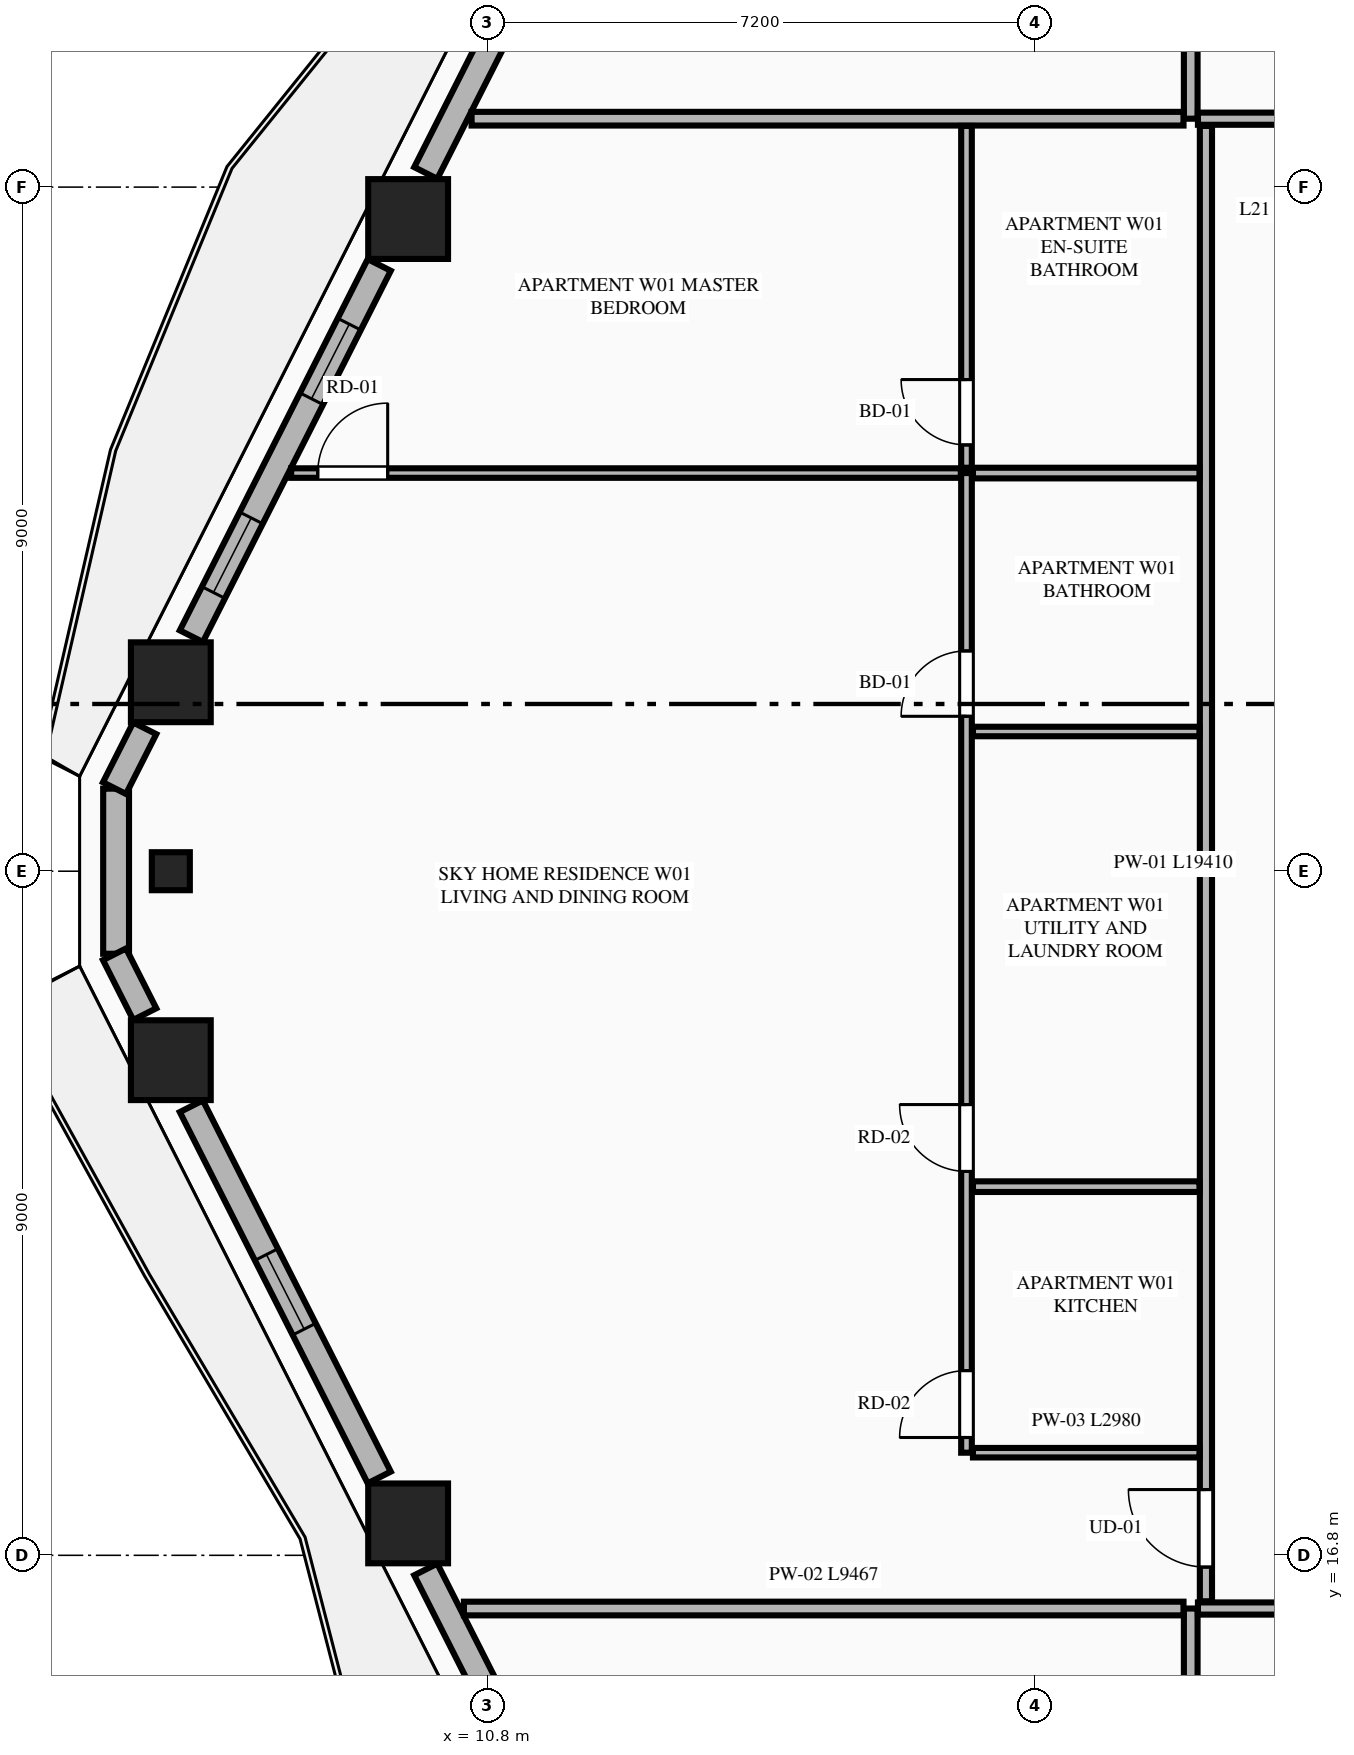
"""IFC4 building model, lengths in metres.
Left out: names, types, materials, properties, quantities, classifications, styles, units other than length and angle.
Written with IfcOpenShell. Run it as: python <this file> out.ifc"""

import sys

from ifc_helpers import new_model, si_unit, direction, frame, frame_2d, origin, origin_2d, place, context, subcontext, project, spatial, rectangle, extrude, element, fill, save


model = new_model("IFC4")
c1 = context("Model", 3, precision=1e-05, world=origin(), true_north=direction((0.0, 1.0)))
c2 = subcontext(c1, "Body", "Model", "MODEL_VIEW")
j1 = project(units=[si_unit("LENGTHUNIT", "METRE"), si_unit("PLANEANGLEUNIT", "RADIAN")], contexts=[c1])
p1 = place(None, origin())
s1 = spatial("IfcSite", under=j1, at=p1, CompositionType="ELEMENT")
p2 = place(p1, origin())
s2 = spatial("IfcBuilding", under=s1, at=p2, CompositionType="ELEMENT")
p3 = place(p2, frame((0.0, 0.0, 83.55)))
s3 = spatial("IfcBuildingStorey", under=s2, at=p3, CompositionType="ELEMENT", Elevation=83.55)
for number, where, z_axis, x_axis in (
    (1, (9.754, 34.38, 0.0), (0.0, 0.0, 1.0), (1.0, 0.0, 0.0)),
    (2, (6.632, 28.286, 0.0), (0.0, 0.0, 1.0), (1.0, 0.0, 0.0)),
    (3, (6.632, 23.314, 0.0), (0.0, 0.0, 1.0), (1.0, 0.0, 0.0)),
    (4, (9.754, 17.22, 0.0), (0.0, 0.0, 1.0), (1.0, 0.0, 0.0)),
):
    element("IfcColumn", number, at=place(p3, frame(where, z_axis=z_axis, x_axis=x_axis)), inside=s3, PredefinedType="COLUMN", context=c2, shape_type="SweptSolid", body=[
        extrude(rectangle(XDim=1.05, YDim=1.05, at=origin_2d()), origin(), (0.0, 0.0, 1.0), 3.55),
    ])
p4 = place(p3, frame((6.632, 25.8, 0.0), z_axis=(0.0, 0.0, 1.0), x_axis=(0.0, -1.0, 0.0)))
e5 = element("IfcColumn", 5, at=p4, inside=s3, PredefinedType="PILASTER", context=c2, shape_type="SweptSolid", body=[
    extrude(rectangle(XDim=0.5, YDim=0.35, at=origin_2d()), origin(), (0.0, 0.0, 1.0), 3.55),
])
p5 = place(p3, frame((5.912, 26.886, 0.0), z_axis=(0.0, 0.0, 1.0), x_axis=(0.0, -1.0, 0.0)))
e6 = element("IfcWall", 6, at=p5, inside=s3, PredefinedType="STANDARD", context=c2, shape_type="SweptSolid", body=[
    extrude(rectangle(XDim=2.172, YDim=0.34, at=frame_2d((1.086, 0.0))), origin(), (0.0, 0.0, 1.0), 3.33),
])
p6 = place(p3, frame((12.567, 40.085, 0.0), z_axis=(0.0, 0.0, 1.0), x_axis=(-0.451599886425, -0.892220568347, 0.0)))
e7 = element("IfcWall", 7, at=p6, inside=s3, PredefinedType="STANDARD", context=c2, shape_type="SweptSolid", body=[
    extrude(rectangle(XDim=5.715, YDim=0.34, at=frame_2d((2.857, 0.0))), origin(), (0.0, 0.0, 1.0), 2.787),
])
p7 = place(p6, frame((1.782, 0.0, 0.0)))
e8 = element("IfcOpeningElement", 8, at=p7, cuts=e7, PredefinedType="OPENING", context=c2, shape_type="SweptSolid", body=[
    extrude(rectangle(XDim=1.1, YDim=2.25, at=frame_2d((0.55, 1.125))), frame((0.0, 0.18, 0.0), z_axis=(0.0, -1.0, 0.0), x_axis=(1.0, 0.0, 0.0)), (0.0, 0.0, 1.0), 0.36),
])
p8 = place(p3, frame((9.374, 33.776, 0.0), z_axis=(0.0, 0.0, 1.0), x_axis=(-0.451597066012, -0.892221995901, 0.0)))
e9 = element("IfcWall", 9, at=p8, inside=s3, PredefinedType="STANDARD", context=c2, shape_type="SweptSolid", body=[
    extrude(rectangle(XDim=5.474, YDim=0.34, at=frame_2d((2.737, 0.0))), origin(), (0.0, 0.0, 1.0), 2.787),
])
p9 = place(p8, frame((0.873, 0.0, 0.75)))
e10 = element("IfcOpeningElement", 10, at=p9, cuts=e9, PredefinedType="OPENING", context=c2, shape_type="SweptSolid", body=[
    extrude(rectangle(XDim=1.1, YDim=1.887, at=frame_2d((0.55, 0.943))), frame((0.0, 0.18, 0.0), z_axis=(0.0, -1.0, 0.0), x_axis=(1.0, 0.0, 0.0)), (0.0, 0.0, 1.0), 0.36),
])
p10 = place(p8, frame((3.73, 0.0, 0.75)))
e11 = element("IfcOpeningElement", 11, at=p10, cuts=e9, PredefinedType="OPENING", context=c2, shape_type="SweptSolid", body=[
    extrude(rectangle(XDim=1.1, YDim=1.887, at=frame_2d((0.55, 0.943))), frame((0.0, 0.18, 0.0), z_axis=(0.0, -1.0, 0.0), x_axis=(1.0, 0.0, 0.0)), (0.0, 0.0, 1.0), 0.36),
])
p11 = place(p3, frame((6.289, 27.68, 0.0), z_axis=(0.0, 0.0, 1.0), x_axis=(-0.451306655769, -0.892368927327, 0.0)))
e12 = element("IfcWall", 12, at=p11, inside=s3, PredefinedType="STANDARD", context=c2, shape_type="SweptSolid", body=[
    extrude(rectangle(XDim=0.882, YDim=0.34, at=frame_2d((0.441, 0.0))), origin(), (0.0, 0.0, 1.0), 3.33),
])
p12 = place(p3, frame((5.891, 24.707, 0.0), z_axis=(0.0, 0.0, 1.0), x_axis=(0.451195173259, -0.892425299747, 0.0)))
e13 = element("IfcWall", 13, at=p12, inside=s3, PredefinedType="STANDARD", context=c2, shape_type="SweptSolid", body=[
    extrude(rectangle(XDim=0.882, YDim=0.34, at=frame_2d((0.441, 0.0))), origin(), (0.0, 0.0, 1.0), 3.33),
])
p13 = place(p3, frame((6.902, 22.708, 0.0), z_axis=(0.0, 0.0, 1.0), x_axis=(0.451579095309, -0.892231091523, 0.0)))
e14 = element("IfcWall", 14, at=p13, inside=s3, PredefinedType="STANDARD", context=c2, shape_type="SweptSolid", body=[
    extrude(rectangle(XDim=5.474, YDim=0.34, at=frame_2d((2.737, 0.0))), origin(), (0.0, 0.0, 1.0), 2.787),
])
p14 = place(p13, frame((2.187, 0.0, 0.75)))
e15 = element("IfcOpeningElement", 15, at=p14, cuts=e14, PredefinedType="OPENING", context=c2, shape_type="SweptSolid", body=[
    extrude(rectangle(XDim=1.1, YDim=1.887, at=frame_2d((0.55, 0.943))), frame((0.0, 0.18, 0.0), z_axis=(0.0, -1.0, 0.0), x_axis=(1.0, 0.0, 0.0)), (0.0, 0.0, 1.0), 0.36),
])
p15 = place(p3, frame((9.986, 16.614, 0.0), z_axis=(0.0, 0.0, 1.0), x_axis=(0.45158267371, -0.892229280401, 0.0)))
e16 = element("IfcWall", 16, at=p15, inside=s3, PredefinedType="STANDARD", context=c2, shape_type="SweptSolid", body=[
    extrude(rectangle(XDim=5.715, YDim=0.34, at=frame_2d((2.857, 0.0))), origin(), (0.0, 0.0, 1.0), 2.787),
])
p16 = place(p15, frame((2.721, 0.0, 0.0)))
e17 = element("IfcOpeningElement", 17, at=p16, cuts=e16, PredefinedType="OPENING", context=c2, shape_type="SweptSolid", body=[
    extrude(rectangle(XDim=1.1, YDim=2.25, at=frame_2d((0.55, 1.125))), frame((0.0, 0.18, 0.0), z_axis=(0.0, -1.0, 0.0), x_axis=(1.0, 0.0, 0.0)), (0.0, 0.0, 1.0), 0.36),
])
p17 = place(p3, frame((20.05, 2.455, 0.0), z_axis=(0.0, 0.0, 1.0), x_axis=(0.0, 1.0, 0.0)))
e18 = element("IfcWall", 18, at=p17, inside=s3, PredefinedType="PARTITIONING", context=c2, shape_type="SweptSolid", body=[
    extrude(rectangle(XDim=13.645, YDim=0.18, at=frame_2d((6.823, 0.0))), origin(), (0.0, 0.0, 1.0), 3.33),
])
p18 = place(p3, frame((20.145, 16.1, 0.0), z_axis=(0.0, 0.0, 1.0), x_axis=(1.0, 0.0, 0.0)))
e19 = element("IfcWall", 19, at=p18, inside=s3, PredefinedType="PARTITIONING", context=c2, shape_type="SweptSolid", body=[
    extrude(rectangle(XDim=24.51, YDim=0.16, at=frame_2d((12.255, 0.0))), origin(), (0.0, 0.0, 1.0), 3.33),
])
p19 = place(p18, frame((22.305, 0.0, 0.0)))
e20 = element("IfcOpeningElement", 20, at=p19, cuts=e19, PredefinedType="OPENING", context=c2, shape_type="SweptSolid", body=[
    extrude(rectangle(XDim=1.02, YDim=2.25, at=frame_2d((0.51, 1.125))), frame((0.0, 0.09, 0.0), z_axis=(0.0, -1.0, 0.0), x_axis=(1.0, 0.0, 0.0)), (0.0, 0.0, 1.0), 0.18),
])
p20 = place(p3, frame((20.05, 35.7, 0.0), z_axis=(0.0, 0.0, 1.0), x_axis=(0.0, 1.0, 0.0)))
e21 = element("IfcWall", 21, at=p20, inside=s3, PredefinedType="PARTITIONING", context=c2, shape_type="SweptSolid", body=[
    extrude(rectangle(XDim=13.445, YDim=0.18, at=frame_2d((6.723, 0.0))), origin(), (0.0, 0.0, 1.0), 3.33),
])
p21 = place(p3, frame((20.145, 35.7, 0.0), z_axis=(0.0, 0.0, 1.0), x_axis=(1.0, 0.0, 0.0)))
e22 = element("IfcWall", 22, at=p21, inside=s3, PredefinedType="PARTITIONING", context=c2, shape_type="SweptSolid", body=[
    extrude(rectangle(XDim=24.51, YDim=0.16, at=frame_2d((12.255, 0.0))), origin(), (0.0, 0.0, 1.0), 3.33),
])
p22 = place(p21, frame((22.305, 0.0, 0.0)))
e23 = element("IfcOpeningElement", 23, at=p22, cuts=e22, PredefinedType="OPENING", context=c2, shape_type="SweptSolid", body=[
    extrude(rectangle(XDim=1.02, YDim=2.25, at=frame_2d((0.51, 1.125))), frame((0.0, 0.09, 0.0), z_axis=(0.0, -1.0, 0.0), x_axis=(1.0, 0.0, 0.0)), (0.0, 0.0, 1.0), 0.18),
])
p23 = place(p3, frame((10.488, 16.1, 0.0), z_axis=(0.0, 0.0, 1.0), x_axis=(1.0, 0.0, 0.0)))
e24 = element("IfcWall", 24, at=p23, inside=s3, PredefinedType="PARTITIONING", context=c2, shape_type="SweptSolid", body=[
    extrude(rectangle(XDim=9.467, YDim=0.18, at=frame_2d((4.733, 0.0))), origin(), (0.0, 0.0, 1.0), 3.33),
])
p24 = place(p3, frame((10.589, 35.7, 0.0), z_axis=(0.0, 0.0, 1.0), x_axis=(1.0, 0.0, 0.0)))
e25 = element("IfcWall", 25, at=p24, inside=s3, PredefinedType="PARTITIONING", context=c2, shape_type="SweptSolid", body=[
    extrude(rectangle(XDim=9.366, YDim=0.18, at=frame_2d((4.683, 0.0))), origin(), (0.0, 0.0, 1.0), 3.33),
])
p25 = place(p3, frame((20.25, 16.195, 0.0), z_axis=(0.0, 0.0, 1.0), x_axis=(0.0, 1.0, 0.0)))
e26 = element("IfcWall", 26, at=p25, inside=s3, PredefinedType="PARTITIONING", context=c2, shape_type="SweptSolid", body=[
    extrude(rectangle(XDim=19.41, YDim=0.16, at=frame_2d((9.705, 0.0))), origin(), (0.0, 0.0, 1.0), 2.636),
])
p26 = place(p25, frame((0.45, 0.0, 0.0)))
e27 = element("IfcOpeningElement", 27, at=p26, cuts=e26, PredefinedType="OPENING", context=c2, shape_type="SweptSolid", body=[
    extrude(rectangle(XDim=1.02, YDim=2.25, at=frame_2d((0.51, 1.125))), frame((0.0, 0.09, 0.0), z_axis=(0.0, -1.0, 0.0), x_axis=(1.0, 0.0, 0.0)), (0.0, 0.0, 1.0), 0.18),
])
p27 = place(p3, frame((17.185, 18.15, 0.0), z_axis=(0.0, 0.0, 1.0), x_axis=(1.0, 0.0, 0.0)))
e28 = element("IfcWall", 28, at=p27, inside=s3, PredefinedType="PARTITIONING", context=c2, shape_type="SweptSolid", body=[
    extrude(rectangle(XDim=2.98, YDim=0.125, at=frame_2d((1.49, 0.0))), origin(), (0.0, 0.0, 1.0), 2.636),
])
p28 = place(p3, frame((17.1, 18.15, 0.0), z_axis=(0.0, 0.0, 1.0), x_axis=(0.0, 1.0, 0.0)))
e29 = element("IfcWall", 29, at=p28, inside=s3, PredefinedType="PLUMBINGWALL", context=c2, shape_type="SweptSolid", body=[
    extrude(rectangle(XDim=12.888, YDim=0.14, at=frame_2d((6.444, 0.0))), origin(), (0.0, 0.0, 1.0), 3.33),
])
p29 = place(p28, frame((0.2, 0.0, 0.0)))
e30 = element("IfcOpeningElement", 30, at=p29, cuts=e29, PredefinedType="OPENING", context=c2, shape_type="SweptSolid", body=[
    extrude(rectangle(XDim=0.88, YDim=2.15, at=frame_2d((0.44, 1.075))), frame((0.0, 0.08, 0.0), z_axis=(0.0, -1.0, 0.0), x_axis=(1.0, 0.0, 0.0)), (0.0, 0.0, 1.0), 0.16),
])
p30 = place(p28, frame((3.7, 0.0, 0.0)))
e31 = element("IfcOpeningElement", 31, at=p30, cuts=e29, PredefinedType="OPENING", context=c2, shape_type="SweptSolid", body=[
    extrude(rectangle(XDim=0.88, YDim=2.15, at=frame_2d((0.44, 1.075))), frame((0.0, 0.08, 0.0), z_axis=(0.0, -1.0, 0.0), x_axis=(1.0, 0.0, 0.0)), (0.0, 0.0, 1.0), 0.16),
])
p31 = place(p28, frame((9.688, 0.0, 0.0)))
e32 = element("IfcOpeningElement", 32, at=p31, cuts=e29, PredefinedType="OPENING", context=c2, shape_type="SweptSolid", body=[
    extrude(rectangle(XDim=0.86, YDim=2.1, at=frame_2d((0.43, 1.05))), frame((0.0, 0.08, 0.0), z_axis=(0.0, -1.0, 0.0), x_axis=(1.0, 0.0, 0.0)), (0.0, 0.0, 1.0), 0.16),
])
p32 = place(p3, frame((17.1, 31.108, 0.0), z_axis=(0.0, 0.0, 1.0), x_axis=(0.0, 1.0, 0.0)))
e33 = element("IfcWall", 33, at=p32, inside=s3, PredefinedType="PLUMBINGWALL", context=c2, shape_type="SweptSolid", body=[
    extrude(rectangle(XDim=4.497, YDim=0.14, at=frame_2d((2.249, 0.0))), origin(), (0.0, 0.0, 1.0), 3.33),
])
p33 = place(p32, frame((0.3, 0.0, 0.0)))
e34 = element("IfcOpeningElement", 34, at=p33, cuts=e33, PredefinedType="OPENING", context=c2, shape_type="SweptSolid", body=[
    extrude(rectangle(XDim=0.86, YDim=2.1, at=frame_2d((0.43, 1.05))), frame((0.0, 0.08, 0.0), z_axis=(0.0, -1.0, 0.0), x_axis=(1.0, 0.0, 0.0)), (0.0, 0.0, 1.0), 0.16),
])
p34 = place(p3, frame((17.185, 31.038, 0.0), z_axis=(0.0, 0.0, 1.0), x_axis=(1.0, 0.0, 0.0)))
e35 = element("IfcWall", 35, at=p34, inside=s3, PredefinedType="PLUMBINGWALL", context=c2, shape_type="SweptSolid", body=[
    extrude(rectangle(XDim=2.98, YDim=0.14, at=frame_2d((1.49, 0.0))), origin(), (0.0, 0.0, 1.0), 3.33),
])
p35 = place(p3, frame((8.215, 31.038, 0.0), z_axis=(0.0, 0.0, 1.0), x_axis=(1.0, 0.0, 0.0)))
e36 = element("IfcWall", 36, at=p35, inside=s3, PredefinedType="PARTITIONING", context=c2, shape_type="SweptSolid", body=[
    extrude(rectangle(XDim=8.81, YDim=0.125, at=frame_2d((4.405, 0.0))), origin(), (0.0, 0.0, 1.0), 3.33),
])
p36 = place(p35, frame((0.35, 0.0, 0.0)))
e37 = element("IfcOpeningElement", 37, at=p36, cuts=e36, PredefinedType="OPENING", context=c2, shape_type="SweptSolid", body=[
    extrude(rectangle(XDim=0.92, YDim=2.15, at=frame_2d((0.46, 1.075))), frame((0.0, 0.073, 0.0), z_axis=(0.0, -1.0, 0.0), x_axis=(1.0, 0.0, 0.0)), (0.0, 0.0, 1.0), 0.145),
])
p37 = place(p3, frame((17.185, 21.65, 0.0), z_axis=(0.0, 0.0, 1.0), x_axis=(1.0, 0.0, 0.0)))
e38 = element("IfcWall", 38, at=p37, inside=s3, PredefinedType="PLUMBINGWALL", context=c2, shape_type="SweptSolid", body=[
    extrude(rectangle(XDim=2.98, YDim=0.14, at=frame_2d((1.49, 0.0))), origin(), (0.0, 0.0, 1.0), 3.33),
])
p38 = place(p3, frame((17.185, 27.638, 0.0), z_axis=(0.0, 0.0, 1.0), x_axis=(1.0, 0.0, 0.0)))
e39 = element("IfcWall", 39, at=p38, inside=s3, PredefinedType="PARTITIONING", context=c2, shape_type="SweptSolid", body=[
    extrude(rectangle(XDim=2.98, YDim=0.125, at=frame_2d((1.49, 0.0))), origin(), (0.0, 0.0, 1.0), 3.33),
])
p39 = place(p9, origin())
e40 = element("IfcWindow", 40, at=p39, inside=s3, PartitioningType="SINGLE_PANEL", PredefinedType="WINDOW", context=c2, shape_type="SweptSolid", body=[
    extrude(rectangle(XDim=1.1, YDim=1.887, at=frame_2d((0.55, 0.943))), frame((0.0, 0.03, 0.0), z_axis=(0.0, -1.0, 0.0), x_axis=(1.0, 0.0, 0.0)), (0.0, 0.0, 1.0), 0.06),
])
fill(e10, e40)
p40 = place(p14, origin())
e41 = element("IfcWindow", 41, at=p40, inside=s3, PartitioningType="SINGLE_PANEL", PredefinedType="WINDOW", context=c2, shape_type="SweptSolid", body=[
    extrude(rectangle(XDim=1.1, YDim=1.887, at=frame_2d((0.55, 0.943))), frame((0.0, 0.03, 0.0), z_axis=(0.0, -1.0, 0.0), x_axis=(1.0, 0.0, 0.0)), (0.0, 0.0, 1.0), 0.06),
])
fill(e15, e41)
p41 = place(p29, origin())
e42 = element("IfcDoor", 42, at=p41, inside=s3, OperationType="SINGLE_SWING_LEFT", PredefinedType="DOOR", context=c2, shape_type="SweptSolid", body=[
    extrude(rectangle(XDim=0.88, YDim=2.15, at=frame_2d((0.44, 1.075))), frame((0.0, 0.025, 0.0), z_axis=(0.0, -1.0, 0.0), x_axis=(1.0, 0.0, 0.0)), (0.0, 0.0, 1.0), 0.05),
])
fill(e30, e42)
p42 = place(p30, origin())
e43 = element("IfcDoor", 43, at=p42, inside=s3, OperationType="SINGLE_SWING_RIGHT", PredefinedType="DOOR", context=c2, shape_type="SweptSolid", body=[
    extrude(rectangle(XDim=0.88, YDim=2.15, at=frame_2d((0.44, 1.075))), frame((0.0, 0.025, 0.0), z_axis=(0.0, -1.0, 0.0), x_axis=(1.0, 0.0, 0.0)), (0.0, 0.0, 1.0), 0.05),
])
fill(e31, e43)
p43 = place(p31, origin())
e44 = element("IfcDoor", 44, at=p43, inside=s3, OperationType="SINGLE_SWING_LEFT", PredefinedType="DOOR", context=c2, shape_type="SweptSolid", body=[
    extrude(rectangle(XDim=0.86, YDim=2.1, at=frame_2d((0.43, 1.05))), frame((0.0, 0.025, 0.0), z_axis=(0.0, -1.0, 0.0), x_axis=(1.0, 0.0, 0.0)), (0.0, 0.0, 1.0), 0.05),
])
fill(e32, e44)
p44 = place(p33, origin())
e45 = element("IfcDoor", 45, at=p44, inside=s3, OperationType="SINGLE_SWING_RIGHT", PredefinedType="DOOR", context=c2, shape_type="SweptSolid", body=[
    extrude(rectangle(XDim=0.86, YDim=2.1, at=frame_2d((0.43, 1.05))), frame((0.0, 0.025, 0.0), z_axis=(0.0, -1.0, 0.0), x_axis=(1.0, 0.0, 0.0)), (0.0, 0.0, 1.0), 0.05),
])
fill(e34, e45)
p45 = place(p26, origin())
e46 = element("IfcDoor", 46, at=p45, inside=s3, OperationType="SINGLE_SWING_RIGHT", PredefinedType="DOOR", context=c2, shape_type="SweptSolid", body=[
    extrude(rectangle(XDim=1.02, YDim=2.25, at=frame_2d((0.51, 1.125))), frame((0.0, 0.025, 0.0), z_axis=(0.0, -1.0, 0.0), x_axis=(1.0, 0.0, 0.0)), (0.0, 0.0, 1.0), 0.05),
])
fill(e27, e46)
p46 = place(p36, origin())
e47 = element("IfcDoor", 47, at=p46, inside=s3, OperationType="SINGLE_SWING_RIGHT", PredefinedType="DOOR", context=c2, shape_type="SweptSolid", body=[
    extrude(rectangle(XDim=0.92, YDim=2.15, at=frame_2d((0.46, 1.075))), frame((0.0, 0.025, 0.0), z_axis=(0.0, -1.0, 0.0), x_axis=(1.0, 0.0, 0.0)), (0.0, 0.0, 1.0), 0.05),
])
fill(e37, e47)
p47 = place(p10, origin())
e48 = element("IfcWindow", 48, at=p47, inside=s3, PartitioningType="SINGLE_PANEL", PredefinedType="WINDOW", context=c2, shape_type="SweptSolid", body=[
    extrude(rectangle(XDim=1.1, YDim=1.887, at=frame_2d((0.55, 0.943))), frame((0.0, 0.03, 0.0), z_axis=(0.0, -1.0, 0.0), x_axis=(1.0, 0.0, 0.0)), (0.0, 0.0, 1.0), 0.06),
])
fill(e11, e48)
save(model, sys.argv[1])
